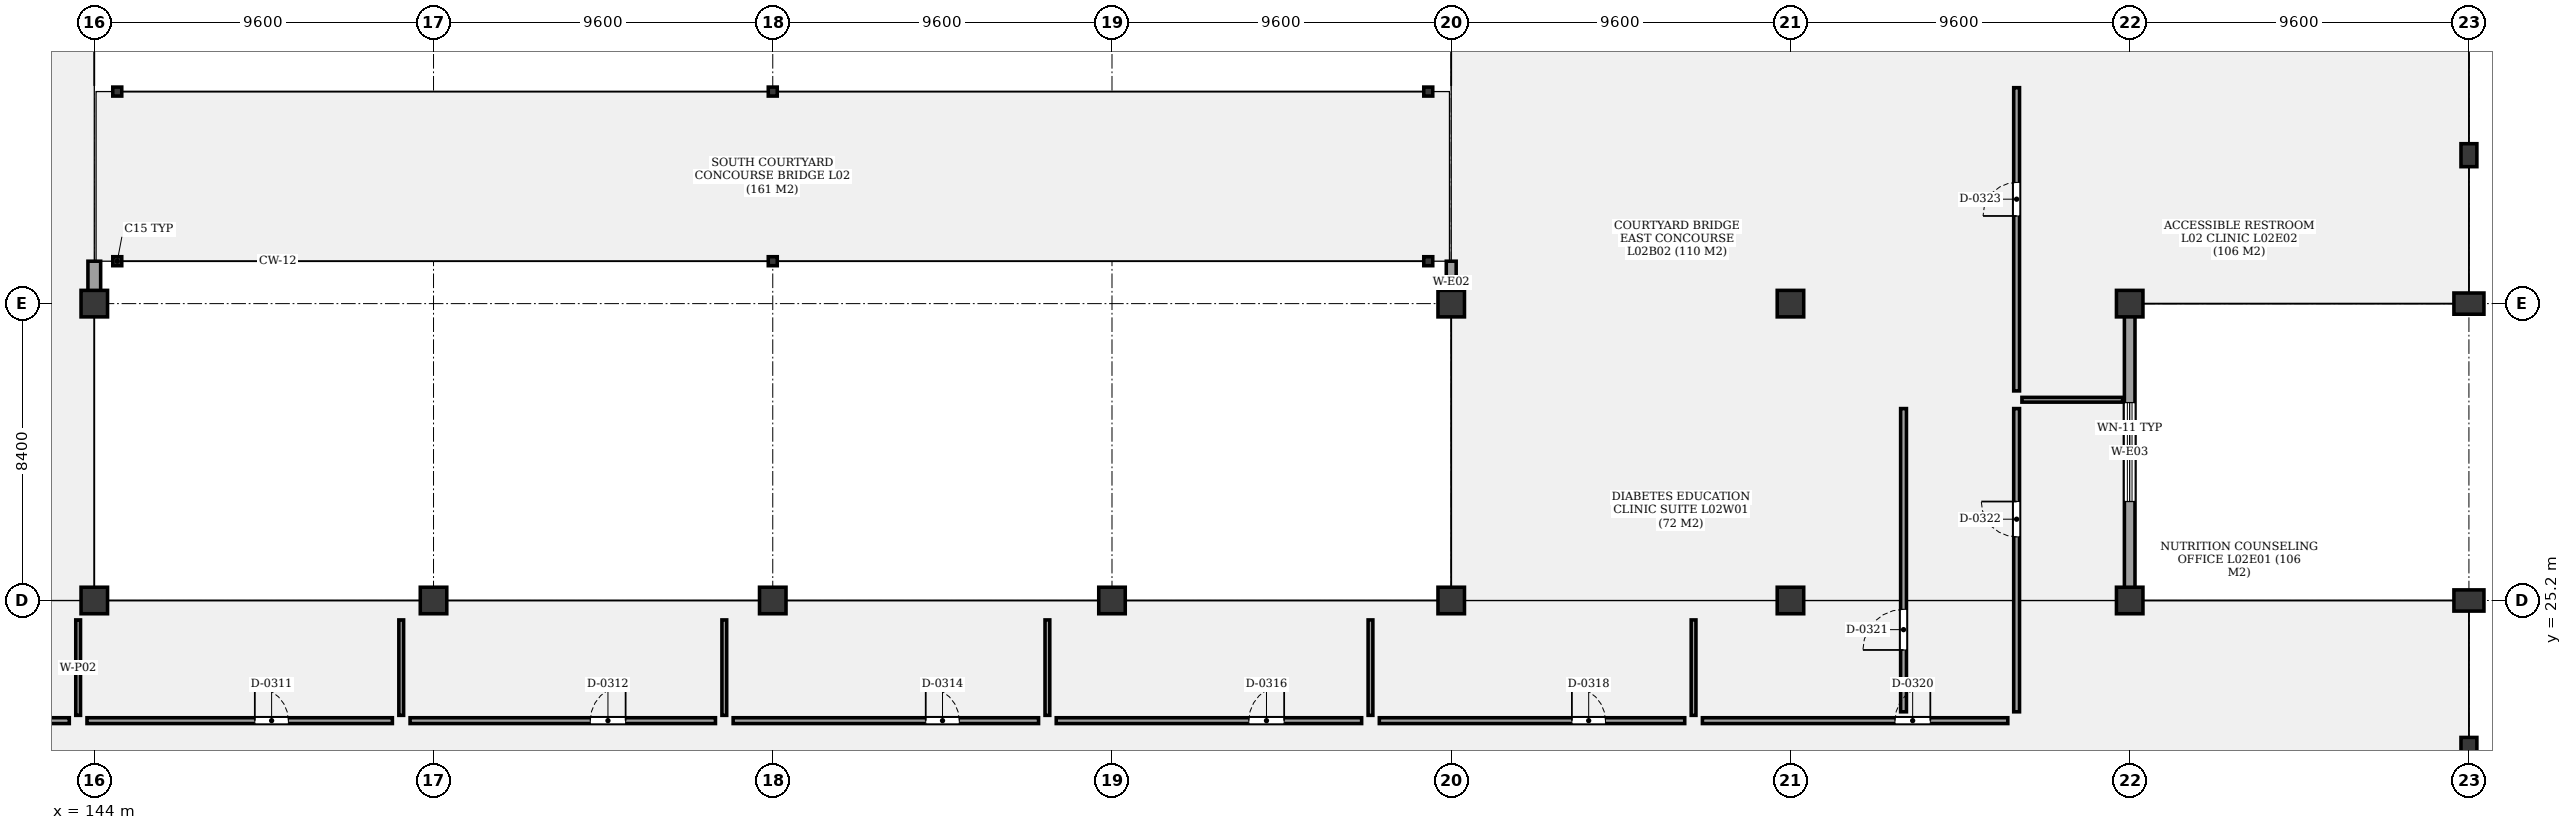
"""IFC4 building model, lengths in metres.
Left out: names, types, materials, properties, quantities, classifications, styles, units other than length and angle.
Written with IfcOpenShell. Run it as: python <this file> out.ifc"""

import sys

from ifc_helpers import new_model, si_unit, direction, frame, frame_2d, origin, origin_2d, place, context, subcontext, project, spatial, rectangle, hollow_rectangle, extrude, element, fill, save


model = new_model("IFC4")
c1 = context("Model", 3, precision=1e-05, world=origin(), true_north=direction((0.0, 1.0)))
c2 = subcontext(c1, "Body", "Model", "MODEL_VIEW")
j1 = project(units=[si_unit("LENGTHUNIT", "METRE"), si_unit("PLANEANGLEUNIT", "RADIAN")], contexts=[c1])
p1 = place(None, origin())
s1 = spatial("IfcSite", under=j1, at=p1, CompositionType="ELEMENT")
p2 = place(p1, origin())
s2 = spatial("IfcBuilding", under=s1, at=p2, CompositionType="ELEMENT")
p3 = place(p2, frame((0.0, 0.0, 9.9)))
s3 = spatial("IfcBuildingStorey", under=s2, at=p3, CompositionType="ELEMENT", Elevation=9.9)
for number, where, z_axis, x_axis in (
    (1, (144.0, 25.2, 0.0), (0.0, 0.0, 1.0), (1.0, 0.0, 0.0)),
    (2, (144.0, 33.6, 0.0), (0.0, 0.0, 1.0), (1.0, 0.0, 0.0)),
):
    element("IfcColumn", number, at=place(p3, frame(where, z_axis=z_axis, x_axis=x_axis)), inside=s3, PredefinedType="COLUMN", context=c2, shape_type="SweptSolid", body=[
        extrude(rectangle(XDim=0.75, YDim=0.75, at=origin_2d()), origin(), (0.0, 0.0, 1.0), 3.6),
    ])
for number, where, z_axis, x_axis in (
    (3, (144.65, 34.8, 0.0), (0.0, 0.0, 1.0), (1.0, 0.0, 0.0)),
    (4, (144.65, 39.6, 0.0), (0.0, 0.0, 1.0), (1.0, 0.0, 0.0)),
):
    element("IfcColumn", number, at=place(p3, frame(where, z_axis=z_axis, x_axis=x_axis)), inside=s3, PredefinedType="COLUMN", context=c2, shape_type="SweptSolid", body=[
        extrude(hollow_rectangle(XDim=0.254, YDim=0.254, WallThickness=0.013, at=origin_2d()), origin(), (0.0, 0.0, 1.0), 3.38),
    ])
for number, where, z_axis, x_axis in (
    (5, (153.6, 25.2, 0.0), (0.0, 0.0, 1.0), (1.0, 0.0, 0.0)),
    (6, (163.2, 25.2, 0.0), (0.0, 0.0, 1.0), (1.0, 0.0, 0.0)),
):
    element("IfcColumn", number, at=place(p3, frame(where, z_axis=z_axis, x_axis=x_axis)), inside=s3, PredefinedType="COLUMN", context=c2, shape_type="SweptSolid", body=[
        extrude(rectangle(XDim=0.75, YDim=0.75, at=origin_2d()), origin(), (0.0, 0.0, 1.0), 3.6),
    ])
for number, where, z_axis, x_axis in (
    (7, (163.2, 34.8, 0.0), (0.0, 0.0, 1.0), (1.0, 0.0, 0.0)),
    (8, (163.2, 39.6, 0.0), (0.0, 0.0, 1.0), (1.0, 0.0, 0.0)),
):
    element("IfcColumn", number, at=place(p3, frame(where, z_axis=z_axis, x_axis=x_axis)), inside=s3, PredefinedType="COLUMN", context=c2, shape_type="SweptSolid", body=[
        extrude(hollow_rectangle(XDim=0.254, YDim=0.254, WallThickness=0.013, at=origin_2d()), origin(), (0.0, 0.0, 1.0), 3.38),
    ])
p4 = place(p3, frame((172.8, 25.2, 0.0), z_axis=(0.0, 0.0, 1.0), x_axis=(1.0, 0.0, 0.0)))
e9 = element("IfcColumn", 9, at=p4, inside=s3, PredefinedType="COLUMN", context=c2, shape_type="SweptSolid", body=[
    extrude(rectangle(XDim=0.75, YDim=0.75, at=origin_2d()), origin(), (0.0, 0.0, 1.0), 3.6),
])
for number, where, z_axis, x_axis in (
    (10, (181.75, 34.8, 0.0), (0.0, 0.0, 1.0), (1.0, 0.0, 0.0)),
    (11, (181.75, 39.6, 0.0), (0.0, 0.0, 1.0), (1.0, 0.0, 0.0)),
):
    element("IfcColumn", number, at=place(p3, frame(where, z_axis=z_axis, x_axis=x_axis)), inside=s3, PredefinedType="COLUMN", context=c2, shape_type="SweptSolid", body=[
        extrude(hollow_rectangle(XDim=0.254, YDim=0.254, WallThickness=0.013, at=origin_2d()), origin(), (0.0, 0.0, 1.0), 3.38),
    ])
for number, where, z_axis, x_axis in (
    (12, (182.4, 25.2, 0.0), (0.0, 0.0, 1.0), (1.0, 0.0, 0.0)),
    (13, (182.4, 33.6, 0.0), (0.0, 0.0, 1.0), (1.0, 0.0, 0.0)),
    (14, (192.0, 25.2, 0.0), (0.0, 0.0, 1.0), (1.0, 0.0, 0.0)),
    (15, (192.0, 33.6, 0.0), (0.0, 0.0, 1.0), (1.0, 0.0, 0.0)),
    (16, (201.6, 25.2, 0.0), (0.0, 0.0, 1.0), (1.0, 0.0, 0.0)),
    (17, (201.6, 33.6, 0.0), (0.0, 0.0, 1.0), (1.0, 0.0, 0.0)),
):
    element("IfcColumn", number, at=place(p3, frame(where, z_axis=z_axis, x_axis=x_axis)), inside=s3, PredefinedType="COLUMN", context=c2, shape_type="SweptSolid", body=[
        extrude(rectangle(XDim=0.75, YDim=0.75, at=origin_2d()), origin(), (0.0, 0.0, 1.0), 3.6),
    ])
for number, where, z_axis, x_axis in (
    (18, (211.2, 25.2, 0.0), (0.0, 0.0, 1.0), (1.0, 0.0, 0.0)),
    (19, (211.2, 33.6, 0.0), (0.0, 0.0, 1.0), (1.0, 0.0, 0.0)),
):
    element("IfcColumn", number, at=place(p3, frame(where, z_axis=z_axis, x_axis=x_axis)), inside=s3, PredefinedType="COLUMN", context=c2, shape_type="SweptSolid", body=[
        extrude(rectangle(XDim=0.85, YDim=0.6, at=origin_2d()), origin(), (0.0, 0.0, 1.0), 3.6),
    ])
for number, where, z_axis, x_axis in (
    (20, (211.2, 21.0, 0.0), (0.0, 0.0, 1.0), (1.0, 0.0, 0.0)),
    (21, (211.2, 37.8, 0.0), (0.0, 0.0, 1.0), (1.0, 0.0, 0.0)),
):
    element("IfcColumn", number, at=place(p3, frame(where, z_axis=z_axis, x_axis=x_axis)), inside=s3, PredefinedType="PILASTER", context=c2, shape_type="SweptSolid", body=[
        extrude(rectangle(XDim=0.45, YDim=0.65, at=origin_2d()), origin(), (0.0, 0.0, 1.0), 3.6),
    ])
p5 = place(p3, frame((144.0, 34.8, 0.0), z_axis=(0.0, 0.0, 1.0), x_axis=(0.0, -1.0, 0.0)))
e22 = element("IfcWall", 22, at=p5, inside=s3, PredefinedType="SOLIDWALL", context=c2, shape_type="SweptSolid", body=[
    extrude(rectangle(XDim=1.2, YDim=0.36, at=frame_2d((0.6, 0.0))), origin(), (0.0, 0.0, 1.0), 2.57),
])
p6 = place(p3, frame((182.4, 33.6, 0.0), z_axis=(0.0, 0.0, 1.0), x_axis=(0.0, 1.0, 0.0)))
e23 = element("IfcWall", 23, at=p6, inside=s3, PredefinedType="SOLIDWALL", context=c2, shape_type="SweptSolid", body=[
    extrude(rectangle(XDim=1.2, YDim=0.28, at=frame_2d((0.6, 0.0))), origin(), (0.0, 0.0, 1.0), 2.57),
])
p7 = place(p3, frame((201.6, 33.44, 0.0), z_axis=(0.0, 0.0, 1.0), x_axis=(0.0, -1.0, 0.0)))
e24 = element("IfcWall", 24, at=p7, inside=s3, PredefinedType="SOLIDWALL", context=c2, shape_type="SweptSolid", body=[
    extrude(rectangle(XDim=8.08, YDim=0.3, at=frame_2d((4.04, 0.0))), origin(), (0.0, 0.0, 1.0), 2.57),
])
p8 = place(p7, frame((2.64, 0.0, 0.85)))
e25 = element("IfcOpeningElement", 25, at=p8, cuts=e24, PredefinedType="OPENING", context=c2, shape_type="SweptSolid", body=[
    extrude(rectangle(XDim=2.8, YDim=1.2, at=frame_2d((1.4, 0.6))), frame((0.0, 0.16, 0.0), z_axis=(0.0, -1.0, 0.0), x_axis=(1.0, 0.0, 0.0)), (0.0, 0.0, 1.0), 0.32),
])
p9 = place(p3, frame((134.65, 21.8, 0.0), z_axis=(0.0, 0.0, 1.0), x_axis=(1.0, 0.0, 0.0)))
e26 = element("IfcWall", 26, at=p9, inside=s3, PredefinedType="PARTITIONING", context=c2, shape_type="SweptSolid", body=[
    extrude(rectangle(XDim=8.643, YDim=0.165, at=frame_2d((4.322, 0.0))), origin(), (0.0, 0.0, 1.0), 2.48),
])
p10 = place(p9, frame((4.75, 0.0, 0.0)))
e27 = element("IfcOpeningElement", 27, at=p10, cuts=e26, PredefinedType="OPENING", context=c2, shape_type="SweptSolid", body=[
    extrude(rectangle(XDim=1.0, YDim=2.2, at=frame_2d((0.5, 1.1))), frame((0.0, 0.093, 0.0), z_axis=(0.0, -1.0, 0.0), x_axis=(1.0, 0.0, 0.0)), (0.0, 0.0, 1.0), 0.185),
])
p11 = place(p3, frame((143.793, 21.8, 0.0), z_axis=(0.0, 0.0, 1.0), x_axis=(1.0, 0.0, 0.0)))
e28 = element("IfcWall", 28, at=p11, inside=s3, PredefinedType="PARTITIONING", context=c2, shape_type="SweptSolid", body=[
    extrude(rectangle(XDim=8.643, YDim=0.165, at=frame_2d((4.322, 0.0))), origin(), (0.0, 0.0, 1.0), 2.48),
])
p12 = place(p11, frame((4.75, 0.0, 0.0)))
e29 = element("IfcOpeningElement", 29, at=p12, cuts=e28, PredefinedType="OPENING", context=c2, shape_type="SweptSolid", body=[
    extrude(rectangle(XDim=0.95, YDim=2.1, at=frame_2d((0.475, 1.05))), frame((0.0, 0.093, 0.0), z_axis=(0.0, -1.0, 0.0), x_axis=(1.0, 0.0, 0.0)), (0.0, 0.0, 1.0), 0.185),
])
p13 = place(p3, frame((143.543, 21.95, 0.0), z_axis=(0.0, 0.0, 1.0), x_axis=(0.0, 1.0, 0.0)))
e30 = element("IfcWall", 30, at=p13, inside=s3, PredefinedType="PARTITIONING", context=c2, shape_type="SweptSolid", body=[
    extrude(rectangle(XDim=2.7, YDim=0.135, at=frame_2d((1.35, 0.0))), origin(), (0.0, 0.0, 1.0), 2.48),
])
p14 = place(p3, frame((152.936, 21.8, 0.0), z_axis=(0.0, 0.0, 1.0), x_axis=(1.0, 0.0, 0.0)))
e31 = element("IfcWall", 31, at=p14, inside=s3, PredefinedType="PARTITIONING", context=c2, shape_type="SweptSolid", body=[
    extrude(rectangle(XDim=8.643, YDim=0.165, at=frame_2d((4.322, 0.0))), origin(), (0.0, 0.0, 1.0), 2.48),
])
p15 = place(p14, frame((5.1, 0.0, 0.0)))
e32 = element("IfcOpeningElement", 32, at=p15, cuts=e31, PredefinedType="OPENING", context=c2, shape_type="SweptSolid", body=[
    extrude(rectangle(XDim=1.0, YDim=2.2, at=frame_2d((0.5, 1.1))), frame((0.0, 0.093, 0.0), z_axis=(0.0, -1.0, 0.0), x_axis=(1.0, 0.0, 0.0)), (0.0, 0.0, 1.0), 0.185),
])
p16 = place(p3, frame((152.686, 21.95, 0.0), z_axis=(0.0, 0.0, 1.0), x_axis=(0.0, 1.0, 0.0)))
e33 = element("IfcWall", 33, at=p16, inside=s3, PredefinedType="PARTITIONING", context=c2, shape_type="SweptSolid", body=[
    extrude(rectangle(XDim=2.7, YDim=0.135, at=frame_2d((1.35, 0.0))), origin(), (0.0, 0.0, 1.0), 2.48),
])
p17 = place(p3, frame((162.079, 21.8, 0.0), z_axis=(0.0, 0.0, 1.0), x_axis=(1.0, 0.0, 0.0)))
e34 = element("IfcWall", 34, at=p17, inside=s3, PredefinedType="PARTITIONING", context=c2, shape_type="SweptSolid", body=[
    extrude(rectangle(XDim=8.643, YDim=0.165, at=frame_2d((4.321, 0.0))), origin(), (0.0, 0.0, 1.0), 2.48),
])
p18 = place(p17, frame((5.45, 0.0, 0.0)))
e35 = element("IfcOpeningElement", 35, at=p18, cuts=e34, PredefinedType="OPENING", context=c2, shape_type="SweptSolid", body=[
    extrude(rectangle(XDim=0.95, YDim=2.1, at=frame_2d((0.475, 1.05))), frame((0.0, 0.093, 0.0), z_axis=(0.0, -1.0, 0.0), x_axis=(1.0, 0.0, 0.0)), (0.0, 0.0, 1.0), 0.185),
])
p19 = place(p3, frame((161.829, 21.95, 0.0), z_axis=(0.0, 0.0, 1.0), x_axis=(0.0, 1.0, 0.0)))
e36 = element("IfcWall", 36, at=p19, inside=s3, PredefinedType="PARTITIONING", context=c2, shape_type="SweptSolid", body=[
    extrude(rectangle(XDim=2.7, YDim=0.135, at=frame_2d((1.35, 0.0))), origin(), (0.0, 0.0, 1.0), 2.48),
])
p20 = place(p3, frame((171.222, 21.8, 0.0), z_axis=(0.0, 0.0, 1.0), x_axis=(1.0, 0.0, 0.0)))
e37 = element("IfcWall", 37, at=p20, inside=s3, PredefinedType="PARTITIONING", context=c2, shape_type="SweptSolid", body=[
    extrude(rectangle(XDim=8.643, YDim=0.165, at=frame_2d((4.322, 0.0))), origin(), (0.0, 0.0, 1.0), 2.48),
])
p21 = place(p20, frame((5.45, 0.0, 0.0)))
e38 = element("IfcOpeningElement", 38, at=p21, cuts=e37, PredefinedType="OPENING", context=c2, shape_type="SweptSolid", body=[
    extrude(rectangle(XDim=1.0, YDim=2.2, at=frame_2d((0.5, 1.1))), frame((0.0, 0.093, 0.0), z_axis=(0.0, -1.0, 0.0), x_axis=(1.0, 0.0, 0.0)), (0.0, 0.0, 1.0), 0.185),
])
p22 = place(p3, frame((170.972, 21.95, 0.0), z_axis=(0.0, 0.0, 1.0), x_axis=(0.0, 1.0, 0.0)))
e39 = element("IfcWall", 39, at=p22, inside=s3, PredefinedType="PARTITIONING", context=c2, shape_type="SweptSolid", body=[
    extrude(rectangle(XDim=2.7, YDim=0.135, at=frame_2d((1.35, 0.0))), origin(), (0.0, 0.0, 1.0), 2.48),
])
p23 = place(p3, frame((180.365, 21.8, 0.0), z_axis=(0.0, 0.0, 1.0), x_axis=(1.0, 0.0, 0.0)))
e40 = element("IfcWall", 40, at=p23, inside=s3, PredefinedType="PARTITIONING", context=c2, shape_type="SweptSolid", body=[
    extrude(rectangle(XDim=8.643, YDim=0.165, at=frame_2d((4.322, 0.0))), origin(), (0.0, 0.0, 1.0), 2.48),
])
p24 = place(p23, frame((5.45, 0.0, 0.0)))
e41 = element("IfcOpeningElement", 41, at=p24, cuts=e40, PredefinedType="OPENING", context=c2, shape_type="SweptSolid", body=[
    extrude(rectangle(XDim=0.95, YDim=2.1, at=frame_2d((0.475, 1.05))), frame((0.0, 0.093, 0.0), z_axis=(0.0, -1.0, 0.0), x_axis=(1.0, 0.0, 0.0)), (0.0, 0.0, 1.0), 0.185),
])
p25 = place(p3, frame((180.115, 21.95, 0.0), z_axis=(0.0, 0.0, 1.0), x_axis=(0.0, 1.0, 0.0)))
e42 = element("IfcWall", 42, at=p25, inside=s3, PredefinedType="PARTITIONING", context=c2, shape_type="SweptSolid", body=[
    extrude(rectangle(XDim=2.7, YDim=0.135, at=frame_2d((1.35, 0.0))), origin(), (0.0, 0.0, 1.0), 2.48),
])
p26 = place(p3, frame((189.508, 21.8, 0.0), z_axis=(0.0, 0.0, 1.0), x_axis=(1.0, 0.0, 0.0)))
e43 = element("IfcWall", 43, at=p26, inside=s3, PredefinedType="PARTITIONING", context=c2, shape_type="SweptSolid", body=[
    extrude(rectangle(XDim=8.643, YDim=0.165, at=frame_2d((4.321, 0.0))), origin(), (0.0, 0.0, 1.0), 2.48),
])
p27 = place(p26, frame((5.45, 0.0, 0.0)))
e44 = element("IfcOpeningElement", 44, at=p27, cuts=e43, PredefinedType="OPENING", context=c2, shape_type="SweptSolid", body=[
    extrude(rectangle(XDim=1.0, YDim=2.2, at=frame_2d((0.5, 1.1))), frame((0.0, 0.093, 0.0), z_axis=(0.0, -1.0, 0.0), x_axis=(1.0, 0.0, 0.0)), (0.0, 0.0, 1.0), 0.185),
])
p28 = place(p3, frame((189.258, 21.95, 0.0), z_axis=(0.0, 0.0, 1.0), x_axis=(0.0, 1.0, 0.0)))
e45 = element("IfcWall", 45, at=p28, inside=s3, PredefinedType="PARTITIONING", context=c2, shape_type="SweptSolid", body=[
    extrude(rectangle(XDim=2.7, YDim=0.135, at=frame_2d((1.35, 0.0))), origin(), (0.0, 0.0, 1.0), 2.48),
])
p29 = place(p3, frame((195.2, 22.05, 0.0), z_axis=(0.0, 0.0, 1.0), x_axis=(0.0, 1.0, 0.0)))
e46 = element("IfcWall", 46, at=p29, inside=s3, PredefinedType="PARTITIONING", context=c2, shape_type="SweptSolid", body=[
    extrude(rectangle(XDim=8.58, YDim=0.165, at=frame_2d((4.29, 0.0))), origin(), (0.0, 0.0, 1.0), 2.48),
])
p30 = place(p29, frame((1.75, 0.0, 0.0)))
e47 = element("IfcOpeningElement", 47, at=p30, cuts=e46, PredefinedType="OPENING", context=c2, shape_type="SweptSolid", body=[
    extrude(rectangle(XDim=1.15, YDim=2.2, at=frame_2d((0.575, 1.1))), frame((0.0, 0.093, 0.0), z_axis=(0.0, -1.0, 0.0), x_axis=(1.0, 0.0, 0.0)), (0.0, 0.0, 1.0), 0.185),
])
p31 = place(p3, frame((198.4, 22.05, 0.0), z_axis=(0.0, 0.0, 1.0), x_axis=(0.0, 1.0, 0.0)))
e48 = element("IfcWall", 48, at=p31, inside=s3, PredefinedType="PARTITIONING", context=c2, shape_type="SweptSolid", body=[
    extrude(rectangle(XDim=8.58, YDim=0.165, at=frame_2d((4.29, 0.0))), origin(), (0.0, 0.0, 1.0), 2.48),
])
p32 = place(p31, frame((4.95, 0.0, 0.0)))
e49 = element("IfcOpeningElement", 49, at=p32, cuts=e48, PredefinedType="OPENING", context=c2, shape_type="SweptSolid", body=[
    extrude(rectangle(XDim=1.0, YDim=2.2, at=frame_2d((0.5, 1.1))), frame((0.0, 0.093, 0.0), z_axis=(0.0, -1.0, 0.0), x_axis=(1.0, 0.0, 0.0)), (0.0, 0.0, 1.0), 0.185),
])
p33 = place(p3, frame((198.4, 31.13, 0.0), z_axis=(0.0, 0.0, 1.0), x_axis=(0.0, 1.0, 0.0)))
e50 = element("IfcWall", 50, at=p33, inside=s3, PredefinedType="PARTITIONING", context=c2, shape_type="SweptSolid", body=[
    extrude(rectangle(XDim=8.58, YDim=0.165, at=frame_2d((4.29, 0.0))), origin(), (0.0, 0.0, 1.0), 2.48),
])
p34 = place(p33, frame((4.95, 0.0, 0.0)))
e51 = element("IfcOpeningElement", 51, at=p34, cuts=e50, PredefinedType="OPENING", context=c2, shape_type="SweptSolid", body=[
    extrude(rectangle(XDim=0.95, YDim=2.1, at=frame_2d((0.475, 1.05))), frame((0.0, 0.093, 0.0), z_axis=(0.0, -1.0, 0.0), x_axis=(1.0, 0.0, 0.0)), (0.0, 0.0, 1.0), 0.185),
])
p35 = place(p3, frame((198.55, 30.88, 0.0), z_axis=(0.0, 0.0, 1.0), x_axis=(1.0, 0.0, 0.0)))
e52 = element("IfcWall", 52, at=p35, inside=s3, PredefinedType="PARTITIONING", context=c2, shape_type="SweptSolid", body=[
    extrude(rectangle(XDim=2.85, YDim=0.135, at=frame_2d((1.425, 0.0))), origin(), (0.0, 0.0, 1.0), 2.48),
])
p36 = place(p8, origin())
e53 = element("IfcWindow", 53, at=p36, inside=s3, PartitioningType="SINGLE_PANEL", PredefinedType="WINDOW", context=c2, shape_type="SweptSolid", body=[
    extrude(rectangle(XDim=2.8, YDim=1.2, at=frame_2d((1.4, 0.6))), frame((0.0, 0.03, 0.0), z_axis=(0.0, -1.0, 0.0), x_axis=(1.0, 0.0, 0.0)), (0.0, 0.0, 1.0), 0.06),
])
fill(e25, e53)
p37 = place(p12, origin())
e54 = element("IfcDoor", 54, at=p37, inside=s3, OperationType="SINGLE_SWING_LEFT", PredefinedType="DOOR", context=c2, shape_type="SweptSolid", body=[
    extrude(rectangle(XDim=0.95, YDim=2.1, at=frame_2d((0.475, 1.05))), frame((0.0, 0.025, 0.0), z_axis=(0.0, -1.0, 0.0), x_axis=(1.0, 0.0, 0.0)), (0.0, 0.0, 1.0), 0.05),
])
fill(e29, e54)
p38 = place(p15, origin())
e55 = element("IfcDoor", 55, at=p38, inside=s3, OperationType="SINGLE_SWING_RIGHT", PredefinedType="DOOR", context=c2, shape_type="SweptSolid", body=[
    extrude(rectangle(XDim=1.0, YDim=2.2, at=frame_2d((0.5, 1.1))), frame((0.0, 0.025, 0.0), z_axis=(0.0, -1.0, 0.0), x_axis=(1.0, 0.0, 0.0)), (0.0, 0.0, 1.0), 0.05),
])
fill(e32, e55)
p39 = place(p18, origin())
e56 = element("IfcDoor", 56, at=p39, inside=s3, OperationType="SINGLE_SWING_LEFT", PredefinedType="DOOR", context=c2, shape_type="SweptSolid", body=[
    extrude(rectangle(XDim=0.95, YDim=2.1, at=frame_2d((0.475, 1.05))), frame((0.0, 0.025, 0.0), z_axis=(0.0, -1.0, 0.0), x_axis=(1.0, 0.0, 0.0)), (0.0, 0.0, 1.0), 0.05),
])
fill(e35, e56)
p40 = place(p21, origin())
e57 = element("IfcDoor", 57, at=p40, inside=s3, OperationType="SINGLE_SWING_RIGHT", PredefinedType="DOOR", context=c2, shape_type="SweptSolid", body=[
    extrude(rectangle(XDim=1.0, YDim=2.2, at=frame_2d((0.5, 1.1))), frame((0.0, 0.025, 0.0), z_axis=(0.0, -1.0, 0.0), x_axis=(1.0, 0.0, 0.0)), (0.0, 0.0, 1.0), 0.05),
])
fill(e38, e57)
p41 = place(p24, origin())
e58 = element("IfcDoor", 58, at=p41, inside=s3, OperationType="SINGLE_SWING_LEFT", PredefinedType="DOOR", context=c2, shape_type="SweptSolid", body=[
    extrude(rectangle(XDim=0.95, YDim=2.1, at=frame_2d((0.475, 1.05))), frame((0.0, 0.025, 0.0), z_axis=(0.0, -1.0, 0.0), x_axis=(1.0, 0.0, 0.0)), (0.0, 0.0, 1.0), 0.05),
])
fill(e41, e58)
p42 = place(p27, origin())
e59 = element("IfcDoor", 59, at=p42, inside=s3, OperationType="SINGLE_SWING_RIGHT", PredefinedType="DOOR", context=c2, shape_type="SweptSolid", body=[
    extrude(rectangle(XDim=1.0, YDim=2.2, at=frame_2d((0.5, 1.1))), frame((0.0, 0.025, 0.0), z_axis=(0.0, -1.0, 0.0), x_axis=(1.0, 0.0, 0.0)), (0.0, 0.0, 1.0), 0.05),
])
fill(e44, e59)
p43 = place(p30, origin())
e60 = element("IfcDoor", 60, at=p43, inside=s3, OperationType="SINGLE_SWING_LEFT", PredefinedType="DOOR", context=c2, shape_type="SweptSolid", body=[
    extrude(rectangle(XDim=1.15, YDim=2.2, at=frame_2d((0.575, 1.1))), frame((0.0, 0.025, 0.0), z_axis=(0.0, -1.0, 0.0), x_axis=(1.0, 0.0, 0.0)), (0.0, 0.0, 1.0), 0.05),
])
fill(e47, e60)
p44 = place(p32, origin())
e61 = element("IfcDoor", 61, at=p44, inside=s3, OperationType="SINGLE_SWING_RIGHT", PredefinedType="DOOR", context=c2, shape_type="SweptSolid", body=[
    extrude(rectangle(XDim=1.0, YDim=2.2, at=frame_2d((0.5, 1.1))), frame((0.0, 0.025, 0.0), z_axis=(0.0, -1.0, 0.0), x_axis=(1.0, 0.0, 0.0)), (0.0, 0.0, 1.0), 0.05),
])
fill(e49, e61)
p45 = place(p34, origin())
e62 = element("IfcDoor", 62, at=p45, inside=s3, OperationType="SINGLE_SWING_LEFT", PredefinedType="DOOR", context=c2, shape_type="SweptSolid", body=[
    extrude(rectangle(XDim=0.95, YDim=2.1, at=frame_2d((0.475, 1.05))), frame((0.0, 0.025, 0.0), z_axis=(0.0, -1.0, 0.0), x_axis=(1.0, 0.0, 0.0)), (0.0, 0.0, 1.0), 0.05),
])
fill(e51, e62)
save(model, sys.argv[1])
